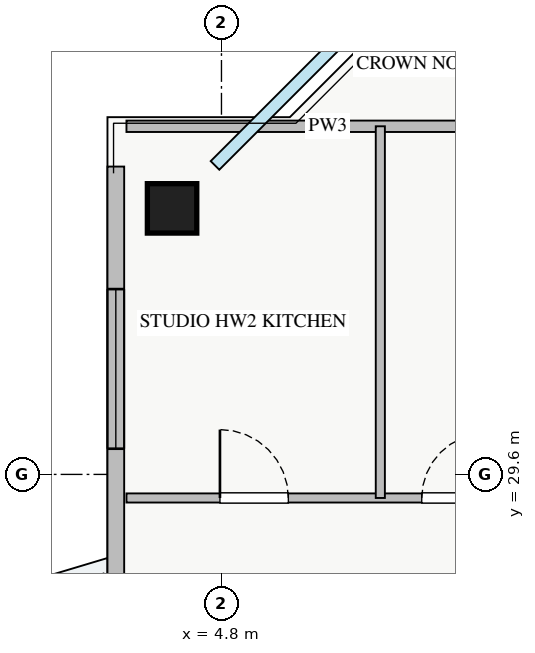
"""IFC4 building model, lengths in metres.
Left out: names, types, materials, properties, quantities, classifications, styles, units other than length and angle.
Written with IfcOpenShell. Run it as: python <this file> out.ifc"""

import sys

from ifc_helpers import new_model, si_unit, direction, frame, frame_2d, origin, origin_2d, place, context, subcontext, project, spatial, rectangle, extrude, source, transform, mapped, element, fill, save


model = new_model("IFC4")
c1 = context("Model", 3, precision=1e-05, world=origin(), true_north=direction((0.0, 1.0)))
c2 = subcontext(c1, "Body", "Model", "MODEL_VIEW")
j1 = project(units=[si_unit("LENGTHUNIT", "METRE"), si_unit("PLANEANGLEUNIT", "RADIAN")], contexts=[c1])
p1 = place(None, origin())
s1 = spatial("IfcSite", under=j1, at=p1, CompositionType="ELEMENT")
p2 = place(p1, origin())
s2 = spatial("IfcBuilding", under=s1, at=p2, CompositionType="ELEMENT")
p3 = place(p2, frame((0.0, 0.0, 247.0)))
s3 = spatial("IfcBuildingStorey", under=s2, at=p3, CompositionType="ELEMENT", Elevation=247.0)
m1 = source(origin(), c2, "Body", "SweptSolid", [
    extrude(rectangle(XDim=0.65, YDim=0.65, at=origin_2d()), origin(), (0.0, 0.0, 1.0), 3.25),
])
p4 = place(p3, frame((4.15, 33.1, 0.0), z_axis=(0.0, 0.0, 1.0), x_axis=(1.0, 0.0, 0.0)))
e1 = element("IfcColumn", 1, at=p4, inside=s3, PredefinedType="COLUMN", context=c2, shape_type="MappedRepresentation", body=[
    mapped(m1, transform((0.0, 0.0, 0.0), x_axis=(1.0, 0.0, 0.0), y_axis=(0.0, 1.0, 0.0), z_axis=(0.0, 0.0, 1.0), scale=1.0)),
])
p5 = place(p3, frame((3.41, 12.35, 0.0), z_axis=(0.0, 0.0, 1.0), x_axis=(0.0, 1.0, 0.0)))
e2 = element("IfcWall", 2, at=p5, inside=s3, PredefinedType="STANDARD", context=c2, shape_type="SweptSolid", body=[
    extrude(rectangle(XDim=21.3, YDim=0.22, at=frame_2d((10.65, 0.0))), origin(), (0.0, 0.0, 1.0), 2.61),
])
p6 = place(p5, frame((11.5, 0.0, 0.0)))
e3 = element("IfcOpeningElement", 3, at=p6, cuts=e2, PredefinedType="OPENING", context=c2, shape_type="SweptSolid", body=[
    extrude(rectangle(XDim=1.2, YDim=2.1, at=frame_2d((0.6, 1.05))), frame((0.0, 0.12, 0.0), z_axis=(0.0, -1.0, 0.0), x_axis=(1.0, 0.0, 0.0)), (0.0, 0.0, 1.0), 0.24),
])
p7 = place(p5, frame((1.463, 0.0, 0.9)))
e4 = element("IfcOpeningElement", 4, at=p7, cuts=e2, PredefinedType="OPENING", context=c2, shape_type="SweptSolid", body=[
    extrude(rectangle(XDim=2.4, YDim=1.48, at=frame_2d((1.2, 0.74))), frame((0.0, 0.12, 0.0), z_axis=(0.0, -1.0, 0.0), x_axis=(1.0, 0.0, 0.0)), (0.0, 0.0, 1.0), 0.24),
])
p8 = place(p5, frame((17.588, 0.0, 0.9)))
e5 = element("IfcOpeningElement", 5, at=p8, cuts=e2, PredefinedType="OPENING", context=c2, shape_type="SweptSolid", body=[
    extrude(rectangle(XDim=2.1, YDim=1.48, at=frame_2d((1.05, 0.74))), frame((0.0, 0.12, 0.0), z_axis=(0.0, -1.0, 0.0), x_axis=(1.0, 0.0, 0.0)), (0.0, 0.0, 1.0), 0.24),
])
p9 = place(p5, frame((12.92, 0.0, 0.9)))
e6 = element("IfcOpeningElement", 6, at=p9, cuts=e2, PredefinedType="OPENING", context=c2, shape_type="SweptSolid", body=[
    extrude(rectangle(XDim=0.9, YDim=1.2, at=frame_2d((0.45, 0.6))), frame((0.0, 0.12, 0.0), z_axis=(0.0, -1.0, 0.0), x_axis=(1.0, 0.0, 0.0)), (0.0, 0.0, 1.0), 0.24),
])
p10 = place(p3, frame((3.55, 34.18, 0.0), z_axis=(0.0, 0.0, 1.0), x_axis=(1.0, 0.0, 0.0)))
e7 = element("IfcWall", 7, at=p10, inside=s3, PredefinedType="PARTITIONING", context=c2, shape_type="SweptSolid", body=[
    extrude(rectangle(XDim=5.3, YDim=0.15, at=frame_2d((2.65, 0.0))), origin(), (0.0, 0.0, 1.0), 3.07),
])
p11 = place(p3, frame((3.55, 29.29, 0.0), z_axis=(0.0, 0.0, 1.0), x_axis=(1.0, 0.0, 0.0)))
e8 = element("IfcWall", 8, at=p11, inside=s3, PredefinedType="PLUMBINGWALL", context=c2, shape_type="SweptSolid", body=[
    extrude(rectangle(XDim=5.3, YDim=0.12, at=frame_2d((2.65, 0.0))), origin(), (0.0, 0.0, 1.0), 3.07),
])
p12 = place(p11, frame((1.23, 0.0, 0.0)))
e9 = element("IfcOpeningElement", 9, at=p12, cuts=e8, PredefinedType="OPENING", context=c2, shape_type="SweptSolid", body=[
    extrude(rectangle(XDim=0.9, YDim=2.05, at=frame_2d((0.45, 1.025))), frame((0.0, 0.07, 0.0), z_axis=(0.0, -1.0, 0.0), x_axis=(1.0, 0.0, 0.0)), (0.0, 0.0, 1.0), 0.14),
])
p13 = place(p11, frame((3.885, 0.0, 0.0)))
e10 = element("IfcOpeningElement", 10, at=p13, cuts=e8, PredefinedType="OPENING", context=c2, shape_type="SweptSolid", body=[
    extrude(rectangle(XDim=0.85, YDim=2.05, at=frame_2d((0.425, 1.025))), frame((0.0, 0.07, 0.0), z_axis=(0.0, -1.0, 0.0), x_axis=(1.0, 0.0, 0.0)), (0.0, 0.0, 1.0), 0.14),
])
p14 = place(p3, frame((6.89, 29.29, 0.0), z_axis=(0.0, 0.0, 1.0), x_axis=(0.0, 1.0, 0.0)))
e11 = element("IfcWall", 11, at=p14, inside=s3, PredefinedType="PLUMBINGWALL", context=c2, shape_type="SweptSolid", body=[
    extrude(rectangle(XDim=4.89, YDim=0.12, at=frame_2d((2.445, 0.0))), origin(), (0.0, 0.0, 1.0), 3.07),
])
m2 = source(origin(), c2, "Body", "SweptSolid", [
    extrude(rectangle(XDim=2.1, YDim=1.48, at=frame_2d((1.05, 0.74))), frame((0.0, 0.03, 0.0), z_axis=(0.0, -1.0, 0.0), x_axis=(1.0, 0.0, 0.0)), (0.0, 0.0, 1.0), 0.06),
])
p15 = place(p8, origin())
e12 = element("IfcWindow", 12, at=p15, inside=s3, PartitioningType="TRIPLE_PANEL_VERTICAL", PredefinedType="WINDOW", context=c2, shape_type="MappedRepresentation", body=[
    mapped(m2, transform((0.0, 0.0, 0.0), x_axis=(1.0, 0.0, 0.0), y_axis=(0.0, 1.0, 0.0), z_axis=(0.0, 0.0, 1.0), scale=1.0)),
])
fill(e5, e12)
m3 = source(origin(), c2, "Body", "SweptSolid", [
    extrude(rectangle(XDim=0.9, YDim=2.05, at=frame_2d((0.45, 1.025))), frame((0.0, 0.025, 0.0), z_axis=(0.0, -1.0, 0.0), x_axis=(1.0, 0.0, 0.0)), (0.0, 0.0, 1.0), 0.05),
])
p16 = place(p12, origin())
e13 = element("IfcDoor", 13, at=p16, inside=s3, OperationType="SINGLE_SWING_LEFT", PredefinedType="DOOR", context=c2, shape_type="MappedRepresentation", body=[
    mapped(m3, transform((0.0, 0.0, 0.0), x_axis=(1.0, 0.0, 0.0), y_axis=(0.0, 1.0, 0.0), z_axis=(0.0, 0.0, 1.0), scale=1.0)),
])
fill(e9, e13)
m4 = source(origin(), c2, "Body", "SweptSolid", [
    extrude(rectangle(XDim=0.85, YDim=2.05, at=frame_2d((0.425, 1.025))), frame((0.0, 0.025, 0.0), z_axis=(0.0, -1.0, 0.0), x_axis=(1.0, 0.0, 0.0)), (0.0, 0.0, 1.0), 0.05),
])
p17 = place(p13, origin())
e14 = element("IfcDoor", 14, at=p17, inside=s3, OperationType="SINGLE_SWING_RIGHT", PredefinedType="DOOR", context=c2, shape_type="MappedRepresentation", body=[
    mapped(m4, transform((0.0, 0.0, 0.0), x_axis=(1.0, 0.0, 0.0), y_axis=(0.0, 1.0, 0.0), z_axis=(0.0, 0.0, 1.0), scale=1.0)),
])
fill(e10, e14)
save(model, sys.argv[1])
